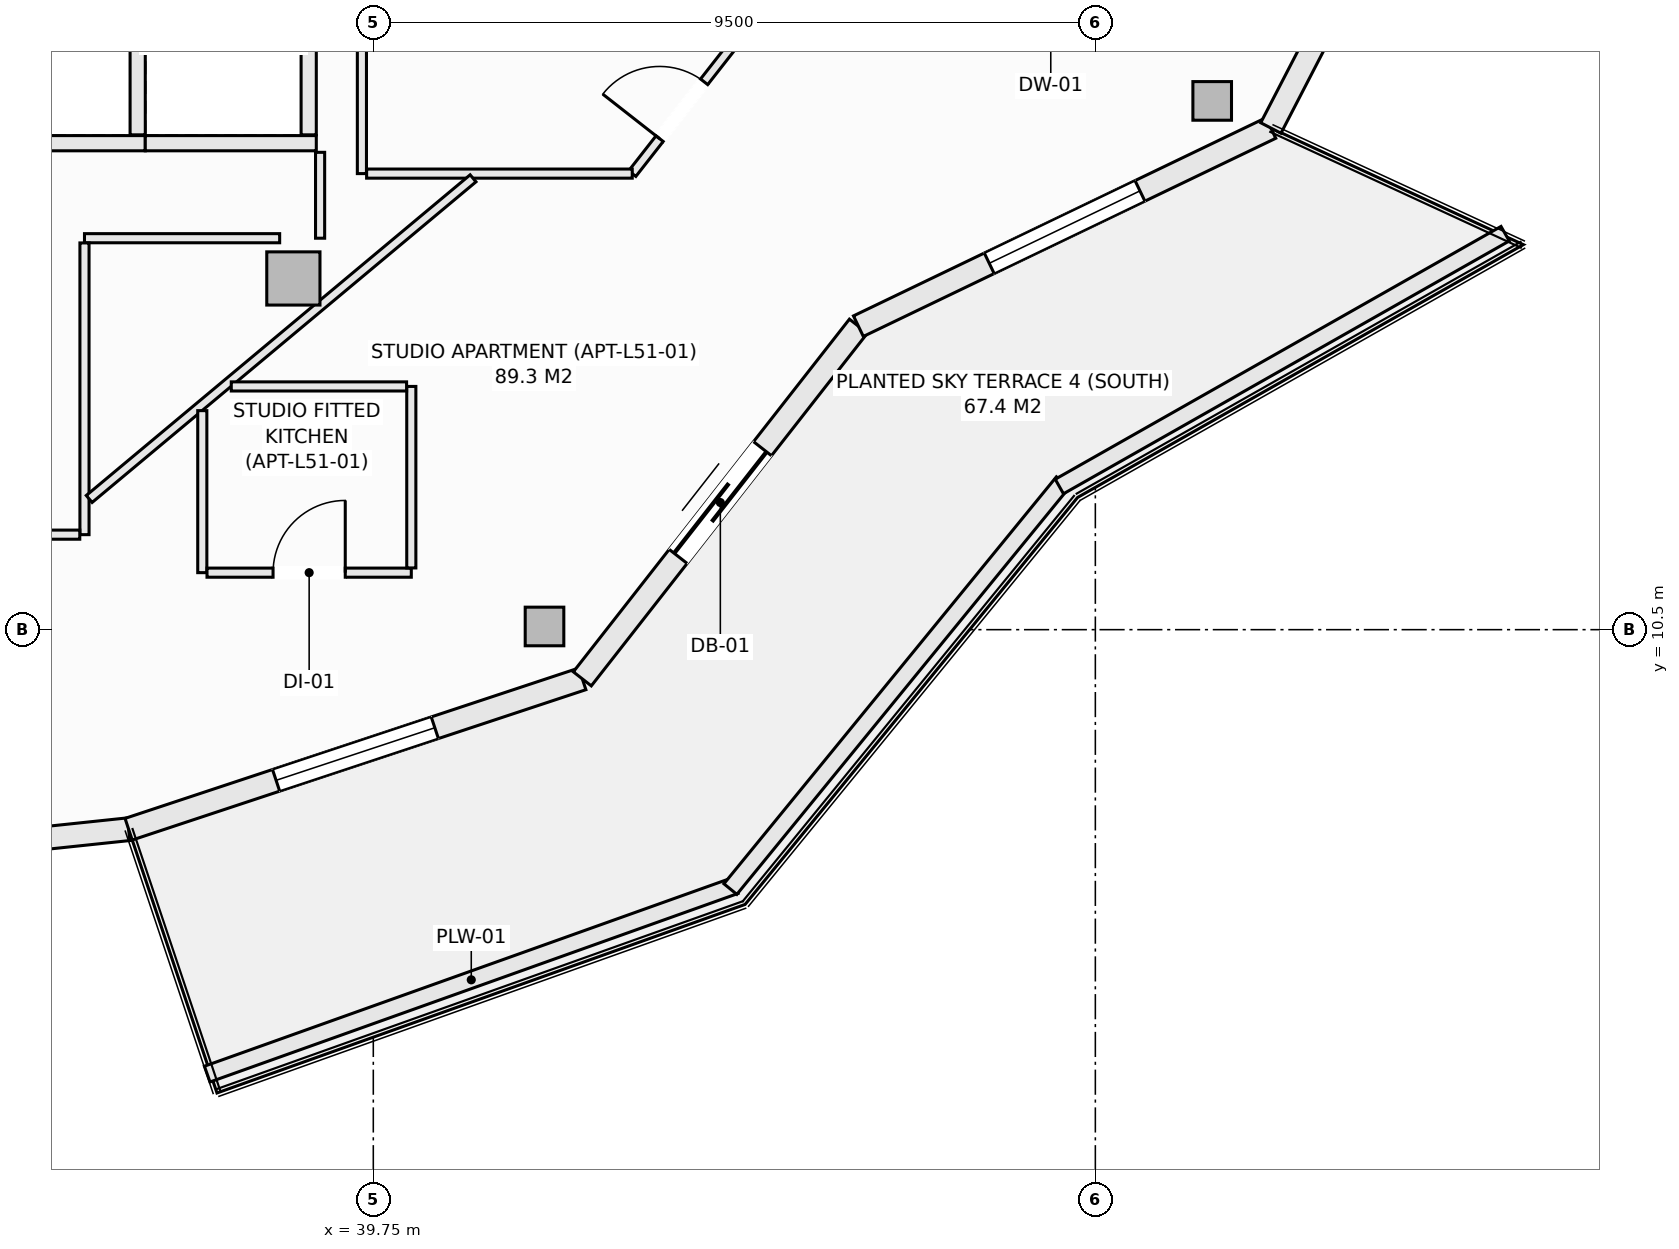
"""IFC4 building model, lengths in metres.
Left out: names, types, materials, properties, quantities, classifications, styles, units other than length and angle.
Written with IfcOpenShell. Run it as: python <this file> out.ifc"""

import sys

from ifc_helpers import new_model, si_unit, direction, frame, frame_2d, origin, origin_2d, place, context, subcontext, project, spatial, rectangle, hollow_rectangle, extrude, element, fill, save


model = new_model("IFC4")
c1 = context("Model", 3, precision=1e-05, world=origin(), true_north=direction((0.0, 1.0)))
c2 = subcontext(c1, "Body", "Model", "MODEL_VIEW")
j1 = project(units=[si_unit("LENGTHUNIT", "METRE"), si_unit("PLANEANGLEUNIT", "RADIAN")], contexts=[c1])
p1 = place(None, origin())
s1 = spatial("IfcSite", under=j1, at=p1, CompositionType="ELEMENT")
p2 = place(p1, origin())
s2 = spatial("IfcBuilding", under=s1, at=p2, CompositionType="ELEMENT")
p3 = place(p2, frame((0.0, 0.0, 196.4)))
s3 = spatial("IfcBuildingStorey", under=s2, at=p3, CompositionType="ELEMENT", Elevation=196.4)
for number, where, z_axis, x_axis in (
    (1, (42.003, 10.542, -0.27), (0.0, 0.0, 1.0), (1.0, 0.0, 0.0)),
    (2, (50.787, 17.456, -0.27), (0.0, 0.0, 1.0), (1.0, 0.0, 0.0)),
):
    element("IfcColumn", number, at=place(p3, frame(where, z_axis=z_axis, x_axis=x_axis)), inside=s3, PredefinedType="COLUMN", context=c2, shape_type="SweptSolid", body=[
        extrude(hollow_rectangle(XDim=0.508, YDim=0.508, WallThickness=0.019, at=origin_2d()), origin(), (0.0, 0.0, 1.0), 3.3),
    ])
p4 = place(p3, frame((38.698, 15.121, -0.27), z_axis=(0.0, 0.0, 1.0), x_axis=(1.0, 0.0, 0.0)))
e3 = element("IfcColumn", 3, at=p4, inside=s3, PredefinedType="COLUMN", context=c2, shape_type="SweptSolid", body=[
    extrude(rectangle(XDim=0.7, YDim=0.7, at=origin_2d()), origin(), (0.0, 0.0, 1.0), 3.3),
])
p5 = place(p3, frame((30.125, 7.2, 0.0), z_axis=(0.0, 0.0, 1.0), x_axis=(0.994497142298, 0.104763705363, 0.0)))
e4 = element("IfcWall", 4, at=p5, inside=s3, PredefinedType="SOLIDWALL", context=c2, shape_type="SweptSolid", body=[
    extrude(rectangle(XDim=6.441, YDim=0.3, at=frame_2d((3.221, 0.0))), origin(), (0.0, 0.0, 1.0), 2.605),
])
p6 = place(p5, frame((2.121, 0.0, 0.72)))
e5 = element("IfcOpeningElement", 5, at=p6, cuts=e4, PredefinedType="OPENING", context=c2, shape_type="SweptSolid", body=[
    extrude(rectangle(XDim=2.2, YDim=1.65, at=frame_2d((1.1, 0.825))), frame((0.0, 0.16, 0.0), z_axis=(0.0, -1.0, 0.0), x_axis=(1.0, 0.0, 0.0)), (0.0, 0.0, 1.0), 0.32),
])
p7 = place(p3, frame((36.531, 7.875, 0.0), z_axis=(0.0, 0.0, 1.0), x_axis=(0.949240877604, 0.314550085495, 0.0)))
e6 = element("IfcWall", 6, at=p7, inside=s3, PredefinedType="SOLIDWALL", context=c2, shape_type="SweptSolid", body=[
    extrude(rectangle(XDim=6.288, YDim=0.3, at=frame_2d((3.144, 0.0))), origin(), (0.0, 0.0, 1.0), 2.605),
])
p8 = place(p7, frame((2.044, 0.0, 0.72)))
e7 = element("IfcOpeningElement", 7, at=p8, cuts=e6, PredefinedType="OPENING", context=c2, shape_type="SweptSolid", body=[
    extrude(rectangle(XDim=2.2, YDim=1.65, at=frame_2d((1.1, 0.825))), frame((0.0, 0.16, 0.0), z_axis=(0.0, -1.0, 0.0), x_axis=(1.0, 0.0, 0.0)), (0.0, 0.0, 1.0), 0.32),
])
p9 = place(p3, frame((42.5, 9.853, 0.0), z_axis=(0.0, 0.0, 1.0), x_axis=(0.616450126935, 0.787393955401, 0.0)))
e8 = element("IfcWall", 8, at=p9, inside=s3, PredefinedType="SOLIDWALL", context=c2, shape_type="SweptSolid", body=[
    extrude(rectangle(XDim=5.893, YDim=0.3, at=frame_2d((2.946, 0.0))), origin(), (0.0, 0.0, 1.0), 2.605),
])
p10 = place(p9, frame((2.046, 0.0, 0.0)))
e9 = element("IfcOpeningElement", 9, at=p10, cuts=e8, PredefinedType="OPENING", context=c2, shape_type="SweptSolid", body=[
    extrude(rectangle(XDim=1.8, YDim=2.25, at=frame_2d((0.9, 1.125))), frame((0.0, 0.16, 0.0), z_axis=(0.0, -1.0, 0.0), x_axis=(1.0, 0.0, 0.0)), (0.0, 0.0, 1.0), 0.32),
])
p11 = place(p3, frame((46.133, 14.493, 0.0), z_axis=(0.0, 0.0, 1.0), x_axis=(0.901348331142, 0.433094892545, 0.0)))
e10 = element("IfcWall", 10, at=p11, inside=s3, PredefinedType="SOLIDWALL", context=c2, shape_type="SweptSolid", body=[
    extrude(rectangle(XDim=6.021, YDim=0.3, at=frame_2d((3.01, 0.0))), origin(), (0.0, 0.0, 1.0), 2.605),
])
p12 = place(p11, frame((1.91, 0.0, 0.72)))
e11 = element("IfcOpeningElement", 11, at=p12, cuts=e10, PredefinedType="OPENING", context=c2, shape_type="SweptSolid", body=[
    extrude(rectangle(XDim=2.2, YDim=1.65, at=frame_2d((1.1, 0.825))), frame((0.0, 0.16, 0.0), z_axis=(0.0, -1.0, 0.0), x_axis=(1.0, 0.0, 0.0)), (0.0, 0.0, 1.0), 0.32),
])
p13 = place(p3, frame((51.559, 17.1, 0.0), z_axis=(0.0, 0.0, 1.0), x_axis=(0.459808219482, 0.888018243786, 0.0)))
e12 = element("IfcWall", 12, at=p13, inside=s3, PredefinedType="SOLIDWALL", context=c2, shape_type="SweptSolid", body=[
    extrude(rectangle(XDim=5.378, YDim=0.3, at=frame_2d((2.689, 0.0))), origin(), (0.0, 0.0, 1.0), 2.605),
])
p14 = place(p13, frame((1.589, 0.0, 0.72)))
e13 = element("IfcOpeningElement", 13, at=p14, cuts=e12, PredefinedType="OPENING", context=c2, shape_type="SweptSolid", body=[
    extrude(rectangle(XDim=2.2, YDim=1.65, at=frame_2d((1.1, 0.825))), frame((0.0, 0.16, 0.0), z_axis=(0.0, -1.0, 0.0), x_axis=(1.0, 0.0, 0.0)), (0.0, 0.0, 1.0), 0.32),
])
p15 = place(p3, frame((37.565, 4.653, 0.0), z_axis=(0.0, 0.0, 1.0), x_axis=(0.941780086523, 0.336229488042, 0.0)))
e14 = element("IfcWall", 14, at=p15, inside=s3, PredefinedType="PARAPET", context=c2, shape_type="SweptSolid", body=[
    extrude(rectangle(XDim=7.378, YDim=0.22, at=frame_2d((3.689, 0.0))), origin(), (0.0, 0.0, 1.0), 0.52),
])
p16 = place(p3, frame((44.448, 7.087, 0.0), z_axis=(0.0, 0.0, 1.0), x_axis=(0.632697312147, 0.774399193699, 0.0)))
e15 = element("IfcWall", 15, at=p16, inside=s3, PredefinedType="PARAPET", context=c2, shape_type="SweptSolid", body=[
    extrude(rectangle(XDim=6.914, YDim=0.22, at=frame_2d((3.457, 0.0))), origin(), (0.0, 0.0, 1.0), 0.52),
])
p17 = place(p3, frame((48.776, 12.383, 0.0), z_axis=(0.0, 0.0, 1.0), x_axis=(0.869860619267, 0.493297580623, 0.0)))
e16 = element("IfcWall", 16, at=p17, inside=s3, PredefinedType="PARAPET", context=c2, shape_type="SweptSolid", body=[
    extrude(rectangle(XDim=6.743, YDim=0.22, at=frame_2d((3.371, 0.0))), origin(), (0.0, 0.0, 1.0), 0.52),
])
p18 = place(p3, frame((34.5, 16.9, 0.0), z_axis=(0.0, 0.0, 1.0), x_axis=(1.0, 0.0, 0.0)))
e17 = element("IfcWall", 17, at=p18, inside=s3, PredefinedType="SOLIDWALL", context=c2, shape_type="SweptSolid", body=[
    extrude(rectangle(XDim=2.25, YDim=0.2, at=frame_2d((1.125, 0.0))), origin(), (0.0, 0.0, 1.0), 3.03),
])
p19 = place(p3, frame((36.65, 17.01, 0.0), z_axis=(0.0, 0.0, 1.0), x_axis=(0.0, 1.0, 0.0)))
e18 = element("IfcWall", 18, at=p19, inside=s3, PredefinedType="SOLIDWALL", context=c2, shape_type="SweptSolid", body=[
    extrude(rectangle(XDim=2.43, YDim=0.2, at=frame_2d((1.215, 0.0))), origin(), (0.0, 0.0, 1.0), 3.03),
])
p20 = place(p3, frame((36.75, 16.9, 0.0), z_axis=(0.0, 0.0, 1.0), x_axis=(1.0, 0.0, 0.0)))
e19 = element("IfcWall", 19, at=p20, inside=s3, PredefinedType="SOLIDWALL", context=c2, shape_type="SweptSolid", body=[
    extrude(rectangle(XDim=2.25, YDim=0.2, at=frame_2d((1.125, 0.0))), origin(), (0.0, 0.0, 1.0), 3.03),
])
p21 = place(p3, frame((38.9, 17.01, 0.0), z_axis=(0.0, 0.0, 1.0), x_axis=(0.0, 1.0, 0.0)))
e20 = element("IfcWall", 20, at=p21, inside=s3, PredefinedType="SOLIDWALL", context=c2, shape_type="SweptSolid", body=[
    extrude(rectangle(XDim=2.43, YDim=0.2, at=frame_2d((1.215, 0.0))), origin(), (0.0, 0.0, 1.0), 3.03),
])
p22 = place(p3, frame((39.05, 15.65, 0.0), z_axis=(0.0, 0.0, 1.0), x_axis=(0.0, 1.0, 0.0)))
e21 = element("IfcWall", 21, at=p22, inside=s3, PredefinedType="PARTITIONING", context=c2, shape_type="SweptSolid", body=[
    extrude(rectangle(XDim=1.13, YDim=0.12, at=frame_2d((0.565, 0.0))), origin(), (0.0, 0.0, 1.0), 2.478),
])
p23 = place(p3, frame((39.6, 16.5, 0.0), z_axis=(0.0, 0.0, 1.0), x_axis=(0.0, 1.0, 0.0)))
e22 = element("IfcWall", 22, at=p23, inside=s3, PredefinedType="PARTITIONING", context=c2, shape_type="SweptSolid", body=[
    extrude(rectangle(XDim=6.52, YDim=0.12, at=frame_2d((3.26, 0.0))), origin(), (0.0, 0.0, 1.0), 2.478),
])
p24 = place(p3, frame((43.157, 16.5, 0.0), z_axis=(0.0, 0.0, 1.0), x_axis=(0.616566276607, 0.787303008092, 0.0)))
e23 = element("IfcWall", 23, at=p24, inside=s3, PredefinedType="PARTITIONING", context=c2, shape_type="SweptSolid", body=[
    extrude(rectangle(XDim=2.398, YDim=0.12, at=frame_2d((1.199, 0.0))), origin(), (0.0, 0.0, 1.0), 3.03),
])
p25 = place(p24, frame((0.584, 0.0, 0.0)))
e24 = element("IfcOpeningElement", 24, at=p25, cuts=e23, PredefinedType="OPENING", context=c2, shape_type="SweptSolid", body=[
    extrude(rectangle(XDim=0.95, YDim=2.1, at=frame_2d((0.475, 1.05))), frame((0.0, 0.07, 0.0), z_axis=(0.0, -1.0, 0.0), x_axis=(1.0, 0.0, 0.0)), (0.0, 0.0, 1.0), 0.14),
])
p26 = place(p3, frame((39.662, 16.5, 0.0), z_axis=(0.0, 0.0, 1.0), x_axis=(1.0, 0.0, 0.0)))
e25 = element("IfcWall", 25, at=p26, inside=s3, PredefinedType="PARTITIONING", context=c2, shape_type="SweptSolid", body=[
    extrude(rectangle(XDim=3.495, YDim=0.12, at=frame_2d((1.748, 0.0))), origin(), (0.0, 0.0, 1.0), 2.712),
])
p27 = place(p3, frame((35.95, 15.65, 0.0), z_axis=(0.0, 0.0, 1.0), x_axis=(1.0, 0.0, 0.0)))
e26 = element("IfcWall", 26, at=p27, inside=s3, PredefinedType="PARTITIONING", context=c2, shape_type="SweptSolid", body=[
    extrude(rectangle(XDim=2.568, YDim=0.12, at=frame_2d((1.284, 0.0))), origin(), (0.0, 0.0, 1.0), 3.03),
])
p28 = place(p3, frame((35.95, 11.75, 0.0), z_axis=(0.0, 0.0, 1.0), x_axis=(0.0, 1.0, 0.0)))
e27 = element("IfcWall", 27, at=p28, inside=s3, PredefinedType="PARTITIONING", context=c2, shape_type="SweptSolid", body=[
    extrude(rectangle(XDim=3.838, YDim=0.12, at=frame_2d((1.919, 0.0))), origin(), (0.0, 0.0, 1.0), 3.03),
])
p29 = place(p3, frame((31.766, 11.75, 0.0), z_axis=(0.0, 0.0, 1.0), x_axis=(1.0, 0.0, 0.0)))
e28 = element("IfcWall", 28, at=p29, inside=s3, PredefinedType="PARTITIONING", context=c2, shape_type="SweptSolid", body=[
    extrude(rectangle(XDim=4.122, YDim=0.12, at=frame_2d((2.061, 0.0))), origin(), (0.0, 0.0, 1.0), 3.03),
])
p30 = place(p29, frame((1.446, 0.0, 0.0)))
e29 = element("IfcOpeningElement", 29, at=p30, cuts=e28, PredefinedType="OPENING", context=c2, shape_type="SweptSolid", body=[
    extrude(rectangle(XDim=0.95, YDim=2.1, at=frame_2d((0.475, 1.05))), frame((0.0, 0.07, 0.0), z_axis=(0.0, -1.0, 0.0), x_axis=(1.0, 0.0, 0.0)), (0.0, 0.0, 1.0), 0.14),
])
p31 = place(p3, frame((36.012, 12.219, 0.0), z_axis=(0.0, 0.0, 1.0), x_axis=(0.767493983483, 0.641056148335, 0.0)))
e30 = element("IfcWall", 30, at=p31, inside=s3, PredefinedType="PARTITIONING", context=c2, shape_type="SweptSolid", body=[
    extrude(rectangle(XDim=6.581, YDim=0.12, at=frame_2d((3.29, 0.0))), origin(), (0.0, 0.0, 1.0), 3.03),
])
p32 = place(p3, frame((37.5, 11.25, 0.0), z_axis=(0.0, 0.0, 1.0), x_axis=(0.0, 1.0, 0.0)))
e31 = element("IfcWall", 31, at=p32, inside=s3, PredefinedType="PARTITIONING", context=c2, shape_type="SweptSolid", body=[
    extrude(rectangle(XDim=2.132, YDim=0.12, at=frame_2d((1.066, 0.0))), origin(), (0.0, 0.0, 1.0), 3.03),
])
p33 = place(p3, frame((37.562, 11.25, 0.0), z_axis=(0.0, 0.0, 1.0), x_axis=(1.0, 0.0, 0.0)))
e32 = element("IfcWall", 32, at=p33, inside=s3, PredefinedType="PARTITIONING", context=c2, shape_type="SweptSolid", body=[
    extrude(rectangle(XDim=2.688, YDim=0.12, at=frame_2d((1.344, 0.0))), origin(), (0.0, 0.0, 1.0), 3.03),
])
p34 = place(p33, frame((0.869, 0.0, 0.0)))
e33 = element("IfcOpeningElement", 33, at=p34, cuts=e32, PredefinedType="OPENING", context=c2, shape_type="SweptSolid", body=[
    extrude(rectangle(XDim=0.95, YDim=2.1, at=frame_2d((0.475, 1.05))), frame((0.0, 0.07, 0.0), z_axis=(0.0, -1.0, 0.0), x_axis=(1.0, 0.0, 0.0)), (0.0, 0.0, 1.0), 0.14),
])
p35 = place(p3, frame((40.25, 11.312, 0.0), z_axis=(0.0, 0.0, 1.0), x_axis=(0.0, 1.0, 0.0)))
e34 = element("IfcWall", 34, at=p35, inside=s3, PredefinedType="PARTITIONING", context=c2, shape_type="SweptSolid", body=[
    extrude(rectangle(XDim=2.388, YDim=0.12, at=frame_2d((1.194, 0.0))), origin(), (0.0, 0.0, 1.0), 2.478),
])
p36 = place(p3, frame((37.881, 13.7, 0.0), z_axis=(0.0, 0.0, 1.0), x_axis=(1.0, 0.0, 0.0)))
e35 = element("IfcWall", 35, at=p36, inside=s3, PredefinedType="PARTITIONING", context=c2, shape_type="SweptSolid", body=[
    extrude(rectangle(XDim=2.307, YDim=0.12, at=frame_2d((1.153, 0.0))), origin(), (0.0, 0.0, 1.0), 3.03),
])
p37 = place(p8, origin())
e36 = element("IfcWindow", 36, at=p37, inside=s3, PartitioningType="SINGLE_PANEL", PredefinedType="WINDOW", context=c2, shape_type="SweptSolid", body=[
    extrude(rectangle(XDim=2.2, YDim=1.65, at=frame_2d((1.1, 0.825))), frame((0.0, 0.03, 0.0), z_axis=(0.0, -1.0, 0.0), x_axis=(1.0, 0.0, 0.0)), (0.0, 0.0, 1.0), 0.06),
])
fill(e7, e36)
p38 = place(p10, frame((1.8, 0.0, 0.0), z_axis=(0.0, 0.0, 1.0), x_axis=(-1.0, 0.0, 0.0)))
e37 = element("IfcDoor", 37, at=p38, inside=s3, OperationType="SLIDING_TO_LEFT", PredefinedType="DOOR", context=c2, shape_type="SweptSolid", body=[
    extrude(rectangle(XDim=1.8, YDim=2.25, at=frame_2d((0.9, 1.125))), frame((0.0, 0.025, 0.0), z_axis=(0.0, -1.0, 0.0), x_axis=(1.0, 0.0, 0.0)), (0.0, 0.0, 1.0), 0.05),
])
fill(e9, e37)
p39 = place(p12, origin())
e38 = element("IfcWindow", 38, at=p39, inside=s3, PartitioningType="SINGLE_PANEL", PredefinedType="WINDOW", context=c2, shape_type="SweptSolid", body=[
    extrude(rectangle(XDim=2.2, YDim=1.65, at=frame_2d((1.1, 0.825))), frame((0.0, 0.03, 0.0), z_axis=(0.0, -1.0, 0.0), x_axis=(1.0, 0.0, 0.0)), (0.0, 0.0, 1.0), 0.06),
])
fill(e11, e38)
p40 = place(p25, origin())
e39 = element("IfcDoor", 39, at=p40, inside=s3, OperationType="SINGLE_SWING_LEFT", PredefinedType="DOOR", context=c2, shape_type="SweptSolid", body=[
    extrude(rectangle(XDim=0.95, YDim=2.1, at=frame_2d((0.475, 1.05))), frame((0.0, 0.025, 0.0), z_axis=(0.0, -1.0, 0.0), x_axis=(1.0, 0.0, 0.0)), (0.0, 0.0, 1.0), 0.05),
])
fill(e24, e39)
p41 = place(p34, origin())
e40 = element("IfcDoor", 40, at=p41, inside=s3, OperationType="SINGLE_SWING_RIGHT", PredefinedType="DOOR", context=c2, shape_type="SweptSolid", body=[
    extrude(rectangle(XDim=0.95, YDim=2.1, at=frame_2d((0.475, 1.05))), frame((0.0, 0.025, 0.0), z_axis=(0.0, -1.0, 0.0), x_axis=(1.0, 0.0, 0.0)), (0.0, 0.0, 1.0), 0.05),
])
fill(e33, e40)
save(model, sys.argv[1])
